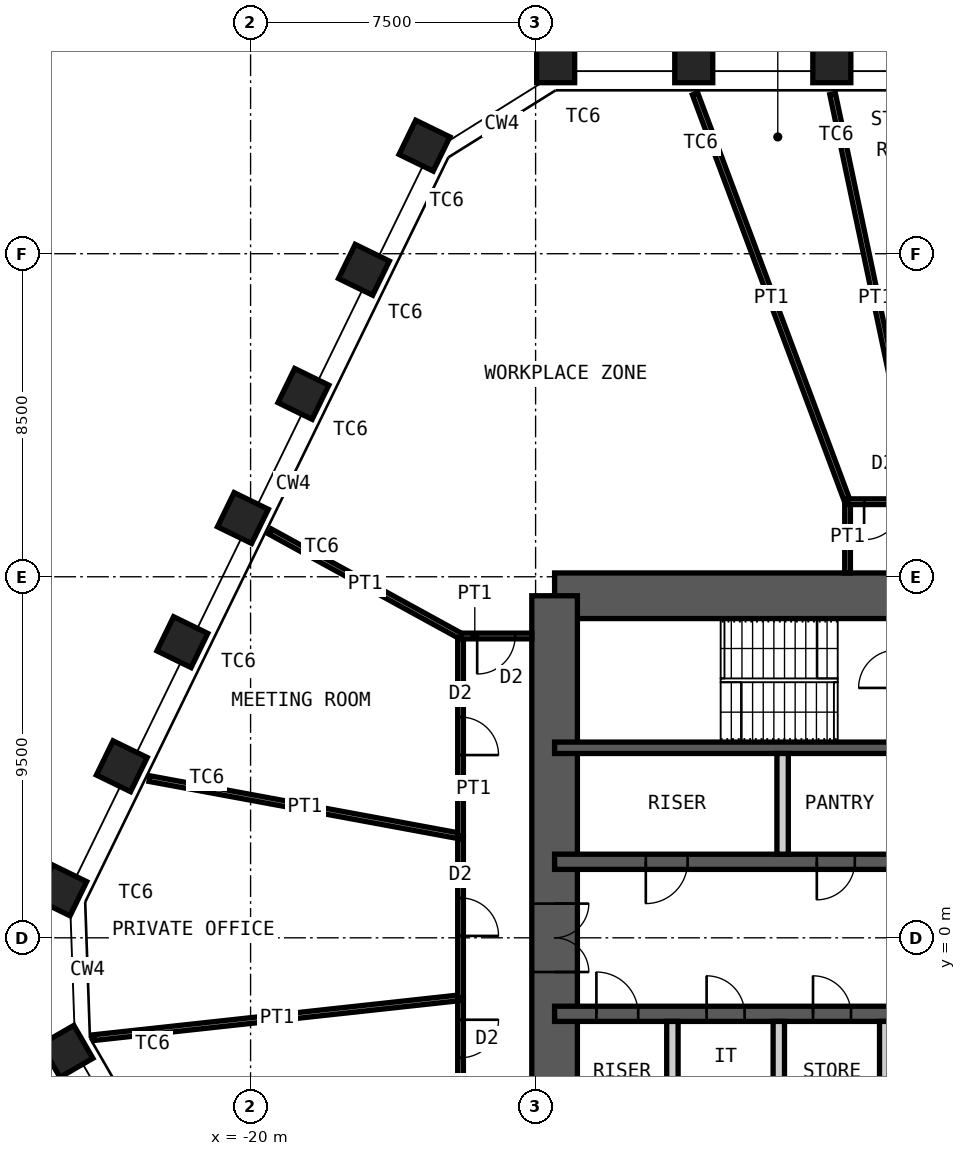
"""IFC4 building model, lengths in metres.
Left out: names, types, materials, properties, quantities, classifications, styles, units other than length and angle.
Written with IfcOpenShell. Run it as: python <this file> out.ifc"""

import sys

from ifc_helpers import new_model, si_unit, direction, frame, frame_2d, origin, origin_2d, place, context, subcontext, project, spatial, rectangle, hollow_rectangle, extrude, element, fill, save


model = new_model("IFC4")
c1 = context("Model", 3, precision=1e-05, world=origin(), true_north=direction((0.0, 1.0)))
c2 = subcontext(c1, "Body", "Model", "MODEL_VIEW")
j1 = project(units=[si_unit("LENGTHUNIT", "METRE"), si_unit("PLANEANGLEUNIT", "RADIAN")], contexts=[c1])
p1 = place(None, origin())
s1 = spatial("IfcSite", under=j1, at=p1, CompositionType="ELEMENT")
p2 = place(p1, origin())
s2 = spatial("IfcBuilding", under=s1, at=p2, CompositionType="ELEMENT")
p3 = place(p2, frame((0.0, 0.0, 235.0)))
s3 = spatial("IfcBuildingStorey", under=s2, at=p3, CompositionType="ELEMENT", Elevation=235.0)
for number, where, z_axis, x_axis in (
    (1, (-11.972, 23.0, 0.0), (0.0, 0.0, 1.0), (-1.0, 0.0, 0.0)),
    (2, (-8.338, 23.0, 0.0), (0.0, 0.0, 1.0), (-1.0, 0.0, 0.0)),
    (3, (-4.705, 23.0, 0.0), (0.0, 0.0, 1.0), (-1.0, 0.0, 0.0)),
    (4, (-24.833, -2.988, 0.0), (0.0, 0.0, 1.0), (0.5, -0.866, 0.0)),
    (5, (-24.981, 1.248, 0.0), (0.0, 0.0, 1.0), (-0.438, -0.899, 0.0)),
    (6, (-23.388, 4.514, 0.0), (0.0, 0.0, 1.0), (-0.438, -0.899, 0.0)),
    (7, (-21.795, 7.78, 0.0), (0.0, 0.0, 1.0), (-0.438, -0.899, 0.0)),
    (8, (-20.203, 11.045, 0.0), (0.0, 0.0, 1.0), (-0.438, -0.899, 0.0)),
    (9, (-18.61, 14.311, 0.0), (0.0, 0.0, 1.0), (-0.438, -0.899, 0.0)),
    (10, (-17.017, 17.577, 0.0), (0.0, 0.0, 1.0), (-0.438, -0.899, 0.0)),
    (11, (-15.424, 20.843, 0.0), (0.0, 0.0, 1.0), (-0.438, -0.899, 0.0)),
):
    element("IfcColumn", number, at=place(p3, frame(where, z_axis=z_axis, x_axis=x_axis)), inside=s3, PredefinedType="COLUMN", context=c2, shape_type="SweptSolid", body=[
        extrude(hollow_rectangle(XDim=1.0, YDim=1.0, WallThickness=0.06, at=origin_2d()), origin(), (0.0, 0.0, 1.0), 4.2),
    ])
p4 = place(p3, frame((-12.0, 9.0, 0.0), z_axis=(0.0, 0.0, 1.0), x_axis=(1.0, 0.0, 0.0)))
e12 = element("IfcWall", 12, at=p4, inside=s3, PredefinedType="SHEAR", context=c2, shape_type="SweptSolid", body=[
    extrude(rectangle(XDim=24.0, YDim=1.2, at=frame_2d((12.0, 0.0))), origin(), (0.0, 0.0, 1.0), 4.2),
])
p5 = place(p4, frame((10.4, 0.0, 0.0)))
e13 = element("IfcOpeningElement", 13, at=p5, cuts=e12, PredefinedType="OPENING", context=c2, shape_type="SweptSolid", body=[
    extrude(rectangle(XDim=1.0, YDim=2.1, at=frame_2d((0.5, 1.05))), frame((0.0, 0.61, 0.0), z_axis=(0.0, -1.0, 0.0), x_axis=(1.0, 0.0, 0.0)), (0.0, 0.0, 1.0), 1.22),
])
p6 = place(p4, frame((17.6, 0.0, 0.0)))
e14 = element("IfcOpeningElement", 14, at=p6, cuts=e12, PredefinedType="OPENING", context=c2, shape_type="SweptSolid", body=[
    extrude(rectangle(XDim=0.9, YDim=2.1, at=frame_2d((0.45, 1.05))), frame((0.0, 0.61, 0.0), z_axis=(0.0, -1.0, 0.0), x_axis=(1.0, 0.0, 0.0)), (0.0, 0.0, 1.0), 1.22),
])
p7 = place(p4, frame((21.9, 0.0, 0.0)))
e15 = element("IfcOpeningElement", 15, at=p7, cuts=e12, PredefinedType="OPENING", context=c2, shape_type="SweptSolid", body=[
    extrude(rectangle(XDim=0.9, YDim=2.1, at=frame_2d((0.45, 1.05))), frame((0.0, 0.61, 0.0), z_axis=(0.0, -1.0, 0.0), x_axis=(1.0, 0.0, 0.0)), (0.0, 0.0, 1.0), 1.22),
])
p8 = place(p3, frame((-12.0, -9.0, 0.0), z_axis=(0.0, 0.0, 1.0), x_axis=(0.0, 1.0, 0.0)))
e16 = element("IfcWall", 16, at=p8, inside=s3, PredefinedType="SHEAR", context=c2, shape_type="SweptSolid", body=[
    extrude(rectangle(XDim=18.0, YDim=1.2, at=frame_2d((9.0, 0.0))), origin(), (0.0, 0.0, 1.0), 4.2),
])
p9 = place(p8, frame((8.1, 0.0, 0.0)))
e17 = element("IfcOpeningElement", 17, at=p9, cuts=e16, PredefinedType="OPENING", context=c2, shape_type="SweptSolid", body=[
    extrude(rectangle(XDim=1.8, YDim=2.1, at=frame_2d((0.9, 1.05))), frame((0.0, 0.61, 0.0), z_axis=(0.0, -1.0, 0.0), x_axis=(1.0, 0.0, 0.0)), (0.0, 0.0, 1.0), 1.22),
])
p10 = place(p3, frame((-12.0, 5.0, 0.0), z_axis=(0.0, 0.0, 1.0), x_axis=(1.0, 0.0, 0.0)))
e18 = element("IfcWall", 18, at=p10, inside=s3, PredefinedType="SHEAR", context=c2, shape_type="SweptSolid", body=[
    extrude(rectangle(XDim=24.0, YDim=0.3, at=frame_2d((12.0, 0.0))), origin(), (0.0, 0.0, 1.0), 4.2),
])
p11 = place(p3, frame((-12.0, 2.0, 0.0), z_axis=(0.0, 0.0, 1.0), x_axis=(1.0, 0.0, 0.0)))
e19 = element("IfcWall", 19, at=p11, inside=s3, PredefinedType="SHEAR", context=c2, shape_type="SweptSolid", body=[
    extrude(rectangle(XDim=24.0, YDim=0.4, at=frame_2d((12.0, 0.0))), origin(), (0.0, 0.0, 1.0), 4.2),
])
p12 = place(p11, frame((2.4, 0.0, 0.0)))
e20 = element("IfcOpeningElement", 20, at=p12, cuts=e19, PredefinedType="OPENING", context=c2, shape_type="SweptSolid", body=[
    extrude(rectangle(XDim=1.1, YDim=2.1, at=frame_2d((0.55, 1.05))), frame((0.0, 0.21, 0.0), z_axis=(0.0, -1.0, 0.0), x_axis=(1.0, 0.0, 0.0)), (0.0, 0.0, 1.0), 0.42),
])
p13 = place(p11, frame((22.0, 0.0, 0.0)))
e21 = element("IfcOpeningElement", 21, at=p13, cuts=e19, PredefinedType="OPENING", context=c2, shape_type="SweptSolid", body=[
    extrude(rectangle(XDim=1.1, YDim=2.1, at=frame_2d((0.55, 1.05))), frame((0.0, 0.21, 0.0), z_axis=(0.0, -1.0, 0.0), x_axis=(1.0, 0.0, 0.0)), (0.0, 0.0, 1.0), 0.42),
])
p14 = place(p11, frame((10.15, 0.0, 0.0)))
e22 = element("IfcOpeningElement", 22, at=p14, cuts=e19, PredefinedType="OPENING", context=c2, shape_type="SweptSolid", body=[
    extrude(rectangle(XDim=1.0, YDim=2.1, at=frame_2d((0.5, 1.05))), frame((0.0, 0.21, 0.0), z_axis=(0.0, -1.0, 0.0), x_axis=(1.0, 0.0, 0.0)), (0.0, 0.0, 1.0), 0.42),
])
p15 = place(p11, frame((6.9, 0.0, 0.0)))
e23 = element("IfcOpeningElement", 23, at=p15, cuts=e19, PredefinedType="OPENING", context=c2, shape_type="SweptSolid", body=[
    extrude(rectangle(XDim=1.0, YDim=2.1, at=frame_2d((0.5, 1.05))), frame((0.0, 0.21, 0.0), z_axis=(0.0, -1.0, 0.0), x_axis=(1.0, 0.0, 0.0)), (0.0, 0.0, 1.0), 0.42),
])
p16 = place(p11, frame((13.35, 0.0, 0.0)))
e24 = element("IfcOpeningElement", 24, at=p16, cuts=e19, PredefinedType="OPENING", context=c2, shape_type="SweptSolid", body=[
    extrude(rectangle(XDim=1.1, YDim=2.4, at=frame_2d((0.55, 1.2))), frame((0.0, 0.21, 0.0), z_axis=(0.0, -1.0, 0.0), x_axis=(1.0, 0.0, 0.0)), (0.0, 0.0, 1.0), 0.42),
])
p17 = place(p11, frame((16.15, 0.0, 0.0)))
e25 = element("IfcOpeningElement", 25, at=p17, cuts=e19, PredefinedType="OPENING", context=c2, shape_type="SweptSolid", body=[
    extrude(rectangle(XDim=1.1, YDim=2.4, at=frame_2d((0.55, 1.2))), frame((0.0, 0.21, 0.0), z_axis=(0.0, -1.0, 0.0), x_axis=(1.0, 0.0, 0.0)), (0.0, 0.0, 1.0), 0.42),
])
p18 = place(p11, frame((18.95, 0.0, 0.0)))
e26 = element("IfcOpeningElement", 26, at=p18, cuts=e19, PredefinedType="OPENING", context=c2, shape_type="SweptSolid", body=[
    extrude(rectangle(XDim=1.1, YDim=2.4, at=frame_2d((0.55, 1.2))), frame((0.0, 0.21, 0.0), z_axis=(0.0, -1.0, 0.0), x_axis=(1.0, 0.0, 0.0)), (0.0, 0.0, 1.0), 0.42),
])
p19 = place(p3, frame((-12.0, -2.0, 0.0), z_axis=(0.0, 0.0, 1.0), x_axis=(1.0, 0.0, 0.0)))
e27 = element("IfcWall", 27, at=p19, inside=s3, PredefinedType="SHEAR", context=c2, shape_type="SweptSolid", body=[
    extrude(rectangle(XDim=24.0, YDim=0.4, at=frame_2d((12.0, 0.0))), origin(), (0.0, 0.0, 1.0), 4.2),
])
p20 = place(p19, frame((1.1, 0.0, 0.0)))
e28 = element("IfcOpeningElement", 28, at=p20, cuts=e27, PredefinedType="OPENING", context=c2, shape_type="SweptSolid", body=[
    extrude(rectangle(XDim=1.1, YDim=2.1, at=frame_2d((0.55, 1.05))), frame((0.0, 0.21, 0.0), z_axis=(0.0, -1.0, 0.0), x_axis=(1.0, 0.0, 0.0)), (0.0, 0.0, 1.0), 0.42),
])
p21 = place(p19, frame((13.55, 0.0, 0.0)))
e29 = element("IfcOpeningElement", 29, at=p21, cuts=e27, PredefinedType="OPENING", context=c2, shape_type="SweptSolid", body=[
    extrude(rectangle(XDim=1.1, YDim=2.1, at=frame_2d((0.55, 1.05))), frame((0.0, 0.21, 0.0), z_axis=(0.0, -1.0, 0.0), x_axis=(1.0, 0.0, 0.0)), (0.0, 0.0, 1.0), 0.42),
])
p22 = place(p19, frame((20.7, 0.0, 0.0)))
e30 = element("IfcOpeningElement", 30, at=p22, cuts=e27, PredefinedType="OPENING", context=c2, shape_type="SweptSolid", body=[
    extrude(rectangle(XDim=1.1, YDim=2.1, at=frame_2d((0.55, 1.05))), frame((0.0, 0.21, 0.0), z_axis=(0.0, -1.0, 0.0), x_axis=(1.0, 0.0, 0.0)), (0.0, 0.0, 1.0), 0.42),
])
p23 = place(p19, frame((4.0, 0.0, 0.0)))
e31 = element("IfcOpeningElement", 31, at=p23, cuts=e27, PredefinedType="OPENING", context=c2, shape_type="SweptSolid", body=[
    extrude(rectangle(XDim=1.0, YDim=2.1, at=frame_2d((0.5, 1.05))), frame((0.0, 0.21, 0.0), z_axis=(0.0, -1.0, 0.0), x_axis=(1.0, 0.0, 0.0)), (0.0, 0.0, 1.0), 0.42),
])
p24 = place(p19, frame((6.8, 0.0, 0.0)))
e32 = element("IfcOpeningElement", 32, at=p24, cuts=e27, PredefinedType="OPENING", context=c2, shape_type="SweptSolid", body=[
    extrude(rectangle(XDim=1.0, YDim=2.1, at=frame_2d((0.5, 1.05))), frame((0.0, 0.21, 0.0), z_axis=(0.0, -1.0, 0.0), x_axis=(1.0, 0.0, 0.0)), (0.0, 0.0, 1.0), 0.42),
])
for number, where, z_axis, x_axis in (
    (33, (-6.0, 2.2, 0.0), (0.0, 0.0, 1.0), (0.0, 1.0, 0.0)),
    (34, (-8.9, -4.85, 0.0), (0.0, 0.0, 1.0), (0.0, 1.0, 0.0)),
    (35, (-6.1, -4.85, 0.0), (0.0, 0.0, 1.0), (0.0, 1.0, 0.0)),
    (36, (-3.3, -4.85, 0.0), (0.0, 0.0, 1.0), (0.0, 1.0, 0.0)),
):
    element("IfcWall", number, at=place(p3, frame(where, z_axis=z_axis, x_axis=x_axis)), inside=s3, PredefinedType="PARTITIONING", context=c2, shape_type="SweptSolid", body=[
        extrude(rectangle(XDim=2.65, YDim=0.3, at=frame_2d((1.325, 0.0))), origin(), (0.0, 0.0, 1.0), 3.98),
    ])
p25 = place(p3, frame((-14.475, -3.736, 0.0), z_axis=(0.0, 0.0, 1.0), x_axis=(0.0, 1.0, 0.0)))
e37 = element("IfcWall", 37, at=p25, inside=s3, PredefinedType="PARTITIONING", context=c2, shape_type="SweptSolid", body=[
    extrude(rectangle(XDim=2.16, YDim=0.15, at=frame_2d((1.08, 0.0))), origin(), (0.0, 0.0, 1.0), 4.03),
])
p26 = place(p25, frame((0.58, 0.0, 0.0)))
e38 = element("IfcOpeningElement", 38, at=p26, cuts=e37, PredefinedType="OPENING", context=c2, shape_type="SweptSolid", body=[
    extrude(rectangle(XDim=1.0, YDim=2.4, at=frame_2d((0.5, 1.2))), frame((0.0, 0.085, 0.0), z_axis=(0.0, -1.0, 0.0), x_axis=(1.0, 0.0, 0.0)), (0.0, 0.0, 1.0), 0.17),
])
p27 = place(p3, frame((-24.128, -2.627, 0.0), z_axis=(0.0, 0.0, 1.0), x_axis=(0.994126892449, 0.108220708326, 0.0)))
e39 = element("IfcWall", 39, at=p27, inside=s3, PredefinedType="PARTITIONING", context=c2, shape_type="SweptSolid", body=[
    extrude(rectangle(XDim=9.71, YDim=0.15, at=frame_2d((4.855, 0.0))), origin(), (0.0, 0.0, 1.0), 2.93),
])
p28 = place(p3, frame((-14.475, -1.576, 0.0), z_axis=(0.0, 0.0, 1.0), x_axis=(0.0, 1.0, 0.0)))
e40 = element("IfcWall", 40, at=p28, inside=s3, PredefinedType="PARTITIONING", context=c2, shape_type="SweptSolid", body=[
    extrude(rectangle(XDim=4.252, YDim=0.15, at=frame_2d((2.126, 0.0))), origin(), (0.0, 0.0, 1.0), 4.03),
])
p29 = place(p28, frame((1.626, 0.0, 0.0)))
e41 = element("IfcOpeningElement", 41, at=p29, cuts=e40, PredefinedType="OPENING", context=c2, shape_type="SweptSolid", body=[
    extrude(rectangle(XDim=1.0, YDim=2.4, at=frame_2d((0.5, 1.2))), frame((0.0, 0.085, 0.0), z_axis=(0.0, -1.0, 0.0), x_axis=(1.0, 0.0, 0.0)), (0.0, 0.0, 1.0), 0.17),
])
p30 = place(p3, frame((-22.661, 4.189, 0.0), z_axis=(0.0, 0.0, 1.0), x_axis=(0.983345347199, -0.181746879316, 0.0)))
e42 = element("IfcWall", 42, at=p30, inside=s3, PredefinedType="PARTITIONING", context=c2, shape_type="SweptSolid", body=[
    extrude(rectangle(XDim=8.324, YDim=0.15, at=frame_2d((4.162, 0.0))), origin(), (0.0, 0.0, 1.0), 3.43),
])
p31 = place(p3, frame((-14.475, 2.676, 0.0), z_axis=(0.0, 0.0, 1.0), x_axis=(0.0, 1.0, 0.0)))
e43 = element("IfcWall", 43, at=p31, inside=s3, PredefinedType="PARTITIONING", context=c2, shape_type="SweptSolid", body=[
    extrude(rectangle(XDim=5.266, YDim=0.15, at=frame_2d((2.633, 0.0))), origin(), (0.0, 0.0, 1.0), 4.03),
])
p32 = place(p31, frame((2.133, 0.0, 0.0)))
e44 = element("IfcOpeningElement", 44, at=p32, cuts=e43, PredefinedType="OPENING", context=c2, shape_type="SweptSolid", body=[
    extrude(rectangle(XDim=1.0, YDim=2.4, at=frame_2d((0.5, 1.2))), frame((0.0, 0.085, 0.0), z_axis=(0.0, -1.0, 0.0), x_axis=(1.0, 0.0, 0.0)), (0.0, 0.0, 1.0), 0.17),
])
p33 = place(p3, frame((-19.486, 10.69, 0.0), z_axis=(0.0, 0.0, 1.0), x_axis=(0.876724089264, -0.480993629172, 0.0)))
e45 = element("IfcWall", 45, at=p33, inside=s3, PredefinedType="PARTITIONING", context=c2, shape_type="SweptSolid", body=[
    extrude(rectangle(XDim=5.715, YDim=0.15, at=frame_2d((2.858, 0.0))), origin(), (0.0, 0.0, 1.0), 3.43),
])
p34 = place(p3, frame((-14.475, 7.941, 0.0), z_axis=(0.0, 0.0, 1.0), x_axis=(1.0, 0.0, 0.0)))
e46 = element("IfcWall", 46, at=p34, inside=s3, PredefinedType="PARTITIONING", context=c2, shape_type="SweptSolid", body=[
    extrude(rectangle(XDim=1.875, YDim=0.15, at=frame_2d((0.938, 0.0))), origin(), (0.0, 0.0, 1.0), 4.03),
])
p35 = place(p34, frame((0.438, 0.0, 0.0)))
e47 = element("IfcOpeningElement", 47, at=p35, cuts=e46, PredefinedType="OPENING", context=c2, shape_type="SweptSolid", body=[
    extrude(rectangle(XDim=1.0, YDim=2.4, at=frame_2d((0.5, 1.2))), frame((0.0, 0.085, 0.0), z_axis=(0.0, -1.0, 0.0), x_axis=(1.0, 0.0, 0.0)), (0.0, 0.0, 1.0), 0.17),
])
p36 = place(p3, frame((-4.291, 9.6, 0.0), z_axis=(0.0, 0.0, 1.0), x_axis=(0.0, 1.0, 0.0)))
e48 = element("IfcWall", 48, at=p36, inside=s3, PredefinedType="PARTITIONING", context=c2, shape_type="SweptSolid", body=[
    extrude(rectangle(XDim=1.875, YDim=0.15, at=frame_2d((0.938, 0.0))), origin(), (0.0, 0.0, 1.0), 4.03),
])
p37 = place(p3, frame((-8.303, 22.206, 0.0), z_axis=(0.0, 0.0, 1.0), x_axis=(0.350242883069, -0.936658914899, 0.0)))
e49 = element("IfcWall", 49, at=p37, inside=s3, PredefinedType="PARTITIONING", context=c2, shape_type="SweptSolid", body=[
    extrude(rectangle(XDim=11.457, YDim=0.15, at=frame_2d((5.729, 0.0))), origin(), (0.0, 0.0, 1.0), 3.43),
])
p38 = place(p3, frame((-4.291, 11.475, 0.0), z_axis=(0.0, 0.0, 1.0), x_axis=(1.0, 0.0, 0.0)))
e50 = element("IfcWall", 50, at=p38, inside=s3, PredefinedType="PARTITIONING", context=c2, shape_type="SweptSolid", body=[
    extrude(rectangle(XDim=1.87, YDim=0.15, at=frame_2d((0.935, 0.0))), origin(), (0.0, 0.0, 1.0), 4.03),
])
p39 = place(p38, frame((0.435, 0.0, 0.0)))
e51 = element("IfcOpeningElement", 51, at=p39, cuts=e50, PredefinedType="OPENING", context=c2, shape_type="SweptSolid", body=[
    extrude(rectangle(XDim=1.0, YDim=2.4, at=frame_2d((0.5, 1.2))), frame((0.0, 0.085, 0.0), z_axis=(0.0, -1.0, 0.0), x_axis=(1.0, 0.0, 0.0)), (0.0, 0.0, 1.0), 0.17),
])
p40 = place(p3, frame((-4.684, 22.202, 0.0), z_axis=(0.0, 0.0, 1.0), x_axis=(0.206456017157, -0.978455881979, 0.0)))
e52 = element("IfcWall", 52, at=p40, inside=s3, PredefinedType="PARTITIONING", context=c2, shape_type="SweptSolid", body=[
    extrude(rectangle(XDim=10.963, YDim=0.15, at=frame_2d((5.481, 0.0))), origin(), (0.0, 0.0, 1.0), 3.43),
])
p41 = place(p12, origin())
e53 = element("IfcDoor", 53, at=p41, inside=s3, OperationType="SINGLE_SWING_LEFT", PredefinedType="DOOR", context=c2, shape_type="SweptSolid", body=[
    extrude(rectangle(XDim=1.1, YDim=2.1, at=frame_2d((0.55, 1.05))), frame((0.0, 0.025, 0.0), z_axis=(0.0, -1.0, 0.0), x_axis=(1.0, 0.0, 0.0)), (0.0, 0.0, 1.0), 0.05),
])
fill(e20, e53)
p42 = place(p20, origin())
e54 = element("IfcDoor", 54, at=p42, inside=s3, OperationType="SINGLE_SWING_RIGHT", PredefinedType="DOOR", context=c2, shape_type="SweptSolid", body=[
    extrude(rectangle(XDim=1.1, YDim=2.1, at=frame_2d((0.55, 1.05))), frame((0.0, 0.025, 0.0), z_axis=(0.0, -1.0, 0.0), x_axis=(1.0, 0.0, 0.0)), (0.0, 0.0, 1.0), 0.05),
])
fill(e28, e54)
p43 = place(p9, origin())
e55 = element("IfcDoor", 55, at=p43, inside=s3, OperationType="DOUBLE_DOOR_DOUBLE_SWING", PredefinedType="DOOR", context=c2, shape_type="SweptSolid", body=[
    extrude(rectangle(XDim=1.8, YDim=2.1, at=frame_2d((0.9, 1.05))), frame((0.0, 0.025, 0.0), z_axis=(0.0, -1.0, 0.0), x_axis=(1.0, 0.0, 0.0)), (0.0, 0.0, 1.0), 0.05),
])
fill(e17, e55)
p44 = place(p15, origin())
e56 = element("IfcDoor", 56, at=p44, inside=s3, OperationType="SINGLE_SWING_LEFT", PredefinedType="DOOR", context=c2, shape_type="SweptSolid", body=[
    extrude(rectangle(XDim=1.0, YDim=2.1, at=frame_2d((0.5, 1.05))), frame((0.0, 0.025, 0.0), z_axis=(0.0, -1.0, 0.0), x_axis=(1.0, 0.0, 0.0)), (0.0, 0.0, 1.0), 0.05),
])
fill(e23, e56)
p45 = place(p23, origin())
e57 = element("IfcDoor", 57, at=p45, inside=s3, OperationType="SINGLE_SWING_RIGHT", PredefinedType="DOOR", context=c2, shape_type="SweptSolid", body=[
    extrude(rectangle(XDim=1.0, YDim=2.1, at=frame_2d((0.5, 1.05))), frame((0.0, 0.025, 0.0), z_axis=(0.0, -1.0, 0.0), x_axis=(1.0, 0.0, 0.0)), (0.0, 0.0, 1.0), 0.05),
])
fill(e31, e57)
p46 = place(p24, origin())
e58 = element("IfcDoor", 58, at=p46, inside=s3, OperationType="SINGLE_SWING_RIGHT", PredefinedType="DOOR", context=c2, shape_type="SweptSolid", body=[
    extrude(rectangle(XDim=1.0, YDim=2.1, at=frame_2d((0.5, 1.05))), frame((0.0, 0.025, 0.0), z_axis=(0.0, -1.0, 0.0), x_axis=(1.0, 0.0, 0.0)), (0.0, 0.0, 1.0), 0.05),
])
fill(e32, e58)
p47 = place(p26, origin())
e59 = element("IfcDoor", 59, at=p47, inside=s3, OperationType="SINGLE_SWING_RIGHT", PredefinedType="DOOR", context=c2, shape_type="SweptSolid", body=[
    extrude(rectangle(XDim=1.0, YDim=2.4, at=frame_2d((0.5, 1.2))), frame((0.0, 0.025, 0.0), z_axis=(0.0, -1.0, 0.0), x_axis=(1.0, 0.0, 0.0)), (0.0, 0.0, 1.0), 0.05),
])
fill(e38, e59)
p48 = place(p29, origin())
e60 = element("IfcDoor", 60, at=p48, inside=s3, OperationType="SINGLE_SWING_LEFT", PredefinedType="DOOR", context=c2, shape_type="SweptSolid", body=[
    extrude(rectangle(XDim=1.0, YDim=2.4, at=frame_2d((0.5, 1.2))), frame((0.0, 0.025, 0.0), z_axis=(0.0, -1.0, 0.0), x_axis=(1.0, 0.0, 0.0)), (0.0, 0.0, 1.0), 0.05),
])
fill(e41, e60)
p49 = place(p32, origin())
e61 = element("IfcDoor", 61, at=p49, inside=s3, OperationType="SINGLE_SWING_LEFT", PredefinedType="DOOR", context=c2, shape_type="SweptSolid", body=[
    extrude(rectangle(XDim=1.0, YDim=2.4, at=frame_2d((0.5, 1.2))), frame((0.0, 0.025, 0.0), z_axis=(0.0, -1.0, 0.0), x_axis=(1.0, 0.0, 0.0)), (0.0, 0.0, 1.0), 0.05),
])
fill(e44, e61)
p50 = place(p35, origin())
e62 = element("IfcDoor", 62, at=p50, inside=s3, OperationType="SINGLE_SWING_LEFT", PredefinedType="DOOR", context=c2, shape_type="SweptSolid", body=[
    extrude(rectangle(XDim=1.0, YDim=2.4, at=frame_2d((0.5, 1.2))), frame((0.0, 0.025, 0.0), z_axis=(0.0, -1.0, 0.0), x_axis=(1.0, 0.0, 0.0)), (0.0, 0.0, 1.0), 0.05),
])
fill(e47, e62)
p51 = place(p39, origin())
e63 = element("IfcDoor", 63, at=p51, inside=s3, OperationType="SINGLE_SWING_LEFT", PredefinedType="DOOR", context=c2, shape_type="SweptSolid", body=[
    extrude(rectangle(XDim=1.0, YDim=2.4, at=frame_2d((0.5, 1.2))), frame((0.0, 0.025, 0.0), z_axis=(0.0, -1.0, 0.0), x_axis=(1.0, 0.0, 0.0)), (0.0, 0.0, 1.0), 0.05),
])
fill(e51, e63)
save(model, sys.argv[1])
